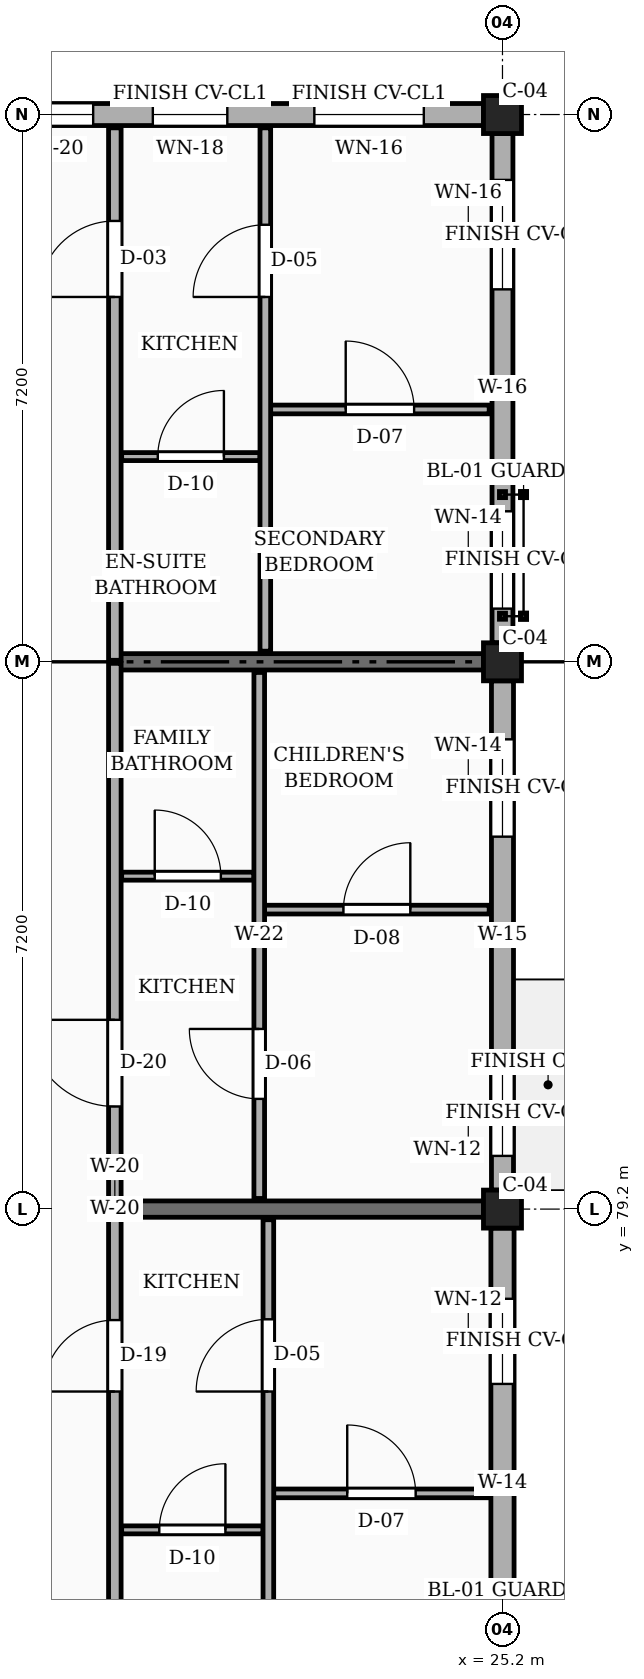
"""IFC4 building model, lengths in metres.
Left out: names, types, materials, properties, quantities, classifications, styles, units other than length and angle.
Written with IfcOpenShell. Run it as: python <this file> out.ifc"""

import sys

from ifc_helpers import new_model, si_unit, direction, frame, frame_2d, origin, origin_2d, place, context, subcontext, project, spatial, rectangle, extrude, element, fill, save


model = new_model("IFC4")
c1 = context("Model", 3, precision=1e-05, world=origin(), true_north=direction((0.0, 1.0)))
c2 = subcontext(c1, "Body", "Model", "MODEL_VIEW")
j1 = project(units=[si_unit("LENGTHUNIT", "METRE"), si_unit("PLANEANGLEUNIT", "RADIAN")], contexts=[c1])
p1 = place(None, origin())
s1 = spatial("IfcSite", under=j1, at=p1, CompositionType="ELEMENT")
p2 = place(p1, origin())
s2 = spatial("IfcBuilding", under=s1, at=p2, CompositionType="ELEMENT")
p3 = place(p2, frame((0.0, 0.0, 26.55)))
s3 = spatial("IfcBuildingStorey", under=s2, at=p3, CompositionType="ELEMENT", Elevation=26.55)
for number, where, z_axis, x_axis in (
    (1, (25.2, 79.2, 0.0), (0.0, 0.0, 1.0), (1.0, 0.0, 0.0)),
    (2, (25.2, 86.4, 0.0), (0.0, 0.0, 1.0), (1.0, 0.0, 0.0)),
    (3, (25.2, 93.6, 0.0), (0.0, 0.0, 1.0), (1.0, 0.0, 0.0)),
):
    element("IfcColumn", number, at=place(p3, frame(where, z_axis=z_axis, x_axis=x_axis)), inside=s3, PredefinedType="COLUMN", context=c2, shape_type="SweptSolid", body=[
        extrude(rectangle(XDim=0.5, YDim=0.5, at=origin_2d()), origin(), (0.0, 0.0, 1.0), 3.15),
    ])
for number, where, z_axis, x_axis in (
    (4, (20.1, 79.2, 0.0), (0.0, 0.0, 1.0), (1.0, 0.0, 0.0)),
    (5, (20.1, 86.4, 0.0), (0.0, 0.0, 1.0), (1.0, 0.0, 0.0)),
):
    element("IfcWall", number, at=place(p3, frame(where, z_axis=z_axis, x_axis=x_axis)), inside=s3, PredefinedType="SOLIDWALL", context=c2, shape_type="SweptSolid", body=[
        extrude(rectangle(XDim=4.85, YDim=0.215, at=frame_2d((2.425, 0.0))), origin(), (0.0, 0.0, 1.0), 2.22),
    ])
p4 = place(p3, frame((25.2, 72.25, 0.0), z_axis=(0.0, 0.0, 1.0), x_axis=(0.0, 1.0, 0.0)))
e6 = element("IfcWall", 6, at=p4, inside=s3, PredefinedType="SOLIDWALL", context=c2, shape_type="SweptSolid", body=[
    extrude(rectangle(XDim=6.7, YDim=0.305, at=frame_2d((3.35, 0.0))), origin(), (0.0, 0.0, 1.0), 2.46),
])
p5 = place(p4, frame((0.45, 0.0, 0.78)))
e7 = element("IfcOpeningElement", 7, at=p5, cuts=e6, PredefinedType="OPENING", context=c2, shape_type="SweptSolid", body=[
    extrude(rectangle(XDim=0.96, YDim=1.26, at=frame_2d((0.48, 0.63))), frame((0.0, 0.163, 0.0), z_axis=(0.0, -1.0, 0.0), x_axis=(1.0, 0.0, 0.0)), (0.0, 0.0, 1.0), 0.325),
])
p6 = place(p4, frame((4.65, 0.0, 0.78)))
e8 = element("IfcOpeningElement", 8, at=p6, cuts=e6, PredefinedType="OPENING", context=c2, shape_type="SweptSolid", body=[
    extrude(rectangle(XDim=1.12, YDim=1.26, at=frame_2d((0.56, 0.63))), frame((0.0, 0.163, 0.0), z_axis=(0.0, -1.0, 0.0), x_axis=(1.0, 0.0, 0.0)), (0.0, 0.0, 1.0), 0.325),
])
p7 = place(p3, frame((25.2, 79.45, 0.0), z_axis=(0.0, 0.0, 1.0), x_axis=(0.0, 1.0, 0.0)))
e9 = element("IfcWall", 9, at=p7, inside=s3, PredefinedType="SOLIDWALL", context=c2, shape_type="SweptSolid", body=[
    extrude(rectangle(XDim=6.7, YDim=0.29, at=frame_2d((3.35, 0.0))), origin(), (0.0, 0.0, 1.0), 2.46),
])
p8 = place(p7, frame((0.45, 0.0, 0.78)))
e10 = element("IfcOpeningElement", 10, at=p8, cuts=e9, PredefinedType="OPENING", context=c2, shape_type="SweptSolid", body=[
    extrude(rectangle(XDim=1.12, YDim=1.26, at=frame_2d((0.56, 0.63))), frame((0.0, 0.155, 0.0), z_axis=(0.0, -1.0, 0.0), x_axis=(1.0, 0.0, 0.0)), (0.0, 0.0, 1.0), 0.31),
])
p9 = place(p7, frame((4.65, 0.0, 0.78)))
e11 = element("IfcOpeningElement", 11, at=p9, cuts=e9, PredefinedType="OPENING", context=c2, shape_type="SweptSolid", body=[
    extrude(rectangle(XDim=1.28, YDim=1.26, at=frame_2d((0.64, 0.63))), frame((0.0, 0.155, 0.0), z_axis=(0.0, -1.0, 0.0), x_axis=(1.0, 0.0, 0.0)), (0.0, 0.0, 1.0), 0.31),
])
p10 = place(p3, frame((25.2, 86.65, 0.0), z_axis=(0.0, 0.0, 1.0), x_axis=(0.0, 1.0, 0.0)))
e12 = element("IfcWall", 12, at=p10, inside=s3, PredefinedType="SOLIDWALL", context=c2, shape_type="SweptSolid", body=[
    extrude(rectangle(XDim=6.7, YDim=0.275, at=frame_2d((3.35, 0.0))), origin(), (0.0, 0.0, 1.0), 2.46),
])
p11 = place(p10, frame((0.45, 0.0, 0.78)))
e13 = element("IfcOpeningElement", 13, at=p11, cuts=e12, PredefinedType="OPENING", context=c2, shape_type="SweptSolid", body=[
    extrude(rectangle(XDim=1.28, YDim=1.26, at=frame_2d((0.64, 0.63))), frame((0.0, 0.147, 0.0), z_axis=(0.0, -1.0, 0.0), x_axis=(1.0, 0.0, 0.0)), (0.0, 0.0, 1.0), 0.295),
])
p12 = place(p10, frame((4.65, 0.0, 0.78)))
e14 = element("IfcOpeningElement", 14, at=p12, cuts=e12, PredefinedType="OPENING", context=c2, shape_type="SweptSolid", body=[
    extrude(rectangle(XDim=1.44, YDim=1.26, at=frame_2d((0.72, 0.63))), frame((0.0, 0.147, 0.0), z_axis=(0.0, -1.0, 0.0), x_axis=(1.0, 0.0, 0.0)), (0.0, 0.0, 1.0), 0.295),
])
p13 = place(p3, frame((24.95, 93.6, 0.0), z_axis=(0.0, 0.0, 1.0), x_axis=(-1.0, 0.0, 0.0)))
e15 = element("IfcWall", 15, at=p13, inside=s3, PredefinedType="SOLIDWALL", context=c2, shape_type="SweptSolid", body=[
    extrude(rectangle(XDim=6.7, YDim=0.29, at=frame_2d((3.35, 0.0))), origin(), (0.0, 0.0, 1.0), 2.46),
])
p14 = place(p13, frame((0.785, 0.0, 0.78)))
e16 = element("IfcOpeningElement", 16, at=p14, cuts=e15, PredefinedType="OPENING", context=c2, shape_type="SweptSolid", body=[
    extrude(rectangle(XDim=1.44, YDim=1.26, at=frame_2d((0.72, 0.63))), frame((0.0, 0.155, 0.0), z_axis=(0.0, -1.0, 0.0), x_axis=(1.0, 0.0, 0.0)), (0.0, 0.0, 1.0), 0.31),
])
p15 = place(p13, frame((3.37, 0.0, 0.78)))
e17 = element("IfcOpeningElement", 17, at=p15, cuts=e15, PredefinedType="OPENING", context=c2, shape_type="SweptSolid", body=[
    extrude(rectangle(XDim=0.98, YDim=1.36, at=frame_2d((0.49, 0.68))), frame((0.0, 0.155, 0.0), z_axis=(0.0, -1.0, 0.0), x_axis=(1.0, 0.0, 0.0)), (0.0, 0.0, 1.0), 0.31),
])
p16 = place(p13, frame((5.135, 0.0, 0.78)))
e18 = element("IfcOpeningElement", 18, at=p16, cuts=e15, PredefinedType="OPENING", context=c2, shape_type="SweptSolid", body=[
    extrude(rectangle(XDim=1.14, YDim=1.36, at=frame_2d((0.57, 0.68))), frame((0.0, 0.155, 0.0), z_axis=(0.0, -1.0, 0.0), x_axis=(1.0, 0.0, 0.0)), (0.0, 0.0, 1.0), 0.31),
])
p17 = place(p3, frame((20.1, 72.02, 0.0), z_axis=(0.0, 0.0, 1.0), x_axis=(0.0, 1.0, 0.0)))
e19 = element("IfcWall", 19, at=p17, inside=s3, PredefinedType="PARTITIONING", context=c2, shape_type="SweptSolid", body=[
    extrude(rectangle(XDim=7.16, YDim=0.165, at=frame_2d((3.58, 0.0))), origin(), (0.0, 0.0, 1.0), 2.325),
])
p18 = place(p17, frame((4.78, 0.0, 0.0)))
e20 = element("IfcOpeningElement", 20, at=p18, cuts=e19, PredefinedType="OPENING", context=c2, shape_type="SweptSolid", body=[
    extrude(rectangle(XDim=0.94, YDim=2.12, at=frame_2d((0.47, 1.06))), frame((0.0, 0.093, 0.0), z_axis=(0.0, -1.0, 0.0), x_axis=(1.0, 0.0, 0.0)), (0.0, 0.0, 1.0), 0.185),
])
p19 = place(p3, frame((20.1, 79.22, 0.0), z_axis=(0.0, 0.0, 1.0), x_axis=(0.0, 1.0, 0.0)))
e21 = element("IfcWall", 21, at=p19, inside=s3, PredefinedType="PARTITIONING", context=c2, shape_type="SweptSolid", body=[
    extrude(rectangle(XDim=7.16, YDim=0.165, at=frame_2d((3.58, 0.0))), origin(), (0.0, 0.0, 1.0), 2.325),
])
p20 = place(p19, frame((1.33, 0.0, 0.0)))
e22 = element("IfcOpeningElement", 22, at=p20, cuts=e21, PredefinedType="OPENING", context=c2, shape_type="SweptSolid", body=[
    extrude(rectangle(XDim=1.14, YDim=2.18, at=frame_2d((0.57, 1.09))), frame((0.0, 0.093, 0.0), z_axis=(0.0, -1.0, 0.0), x_axis=(1.0, 0.0, 0.0)), (0.0, 0.0, 1.0), 0.185),
])
p21 = place(p3, frame((20.1, 86.42, 0.0), z_axis=(0.0, 0.0, 1.0), x_axis=(0.0, 1.0, 0.0)))
e23 = element("IfcWall", 23, at=p21, inside=s3, PredefinedType="PARTITIONING", context=c2, shape_type="SweptSolid", body=[
    extrude(rectangle(XDim=7.005, YDim=0.165, at=frame_2d((3.502, 0.0))), origin(), (0.0, 0.0, 1.0), 2.325),
])
p22 = place(p21, frame((4.78, 0.0, 0.0)))
e24 = element("IfcOpeningElement", 24, at=p22, cuts=e23, PredefinedType="OPENING", context=c2, shape_type="SweptSolid", body=[
    extrude(rectangle(XDim=1.0, YDim=2.15, at=frame_2d((0.5, 1.075))), frame((0.0, 0.093, 0.0), z_axis=(0.0, -1.0, 0.0), x_axis=(1.0, 0.0, 0.0)), (0.0, 0.0, 1.0), 0.185),
])
p23 = place(p3, frame((22.19, 75.46, 0.0), z_axis=(0.0, 0.0, 1.0), x_axis=(1.0, 0.0, 0.0)))
e25 = element("IfcWall", 25, at=p23, inside=s3, PredefinedType="PARTITIONING", context=c2, shape_type="SweptSolid", body=[
    extrude(rectangle(XDim=2.835, YDim=0.115, at=frame_2d((1.417, 0.0))), origin(), (0.0, 0.0, 1.0), 2.325),
])
p24 = place(p23, frame((0.968, 0.0, 0.0)))
e26 = element("IfcOpeningElement", 26, at=p24, cuts=e25, PredefinedType="OPENING", context=c2, shape_type="SweptSolid", body=[
    extrude(rectangle(XDim=0.9, YDim=2.1, at=frame_2d((0.45, 1.05))), frame((0.0, 0.067, 0.0), z_axis=(0.0, -1.0, 0.0), x_axis=(1.0, 0.0, 0.0)), (0.0, 0.0, 1.0), 0.135),
])
p25 = place(p3, frame((20.19, 74.98, 0.0), z_axis=(0.0, 0.0, 1.0), x_axis=(1.0, 0.0, 0.0)))
e27 = element("IfcWall", 27, at=p25, inside=s3, PredefinedType="PARTITIONING", context=c2, shape_type="SweptSolid", body=[
    extrude(rectangle(XDim=1.86, YDim=0.105, at=frame_2d((0.93, 0.0))), origin(), (0.0, 0.0, 1.0), 2.325),
])
p26 = place(p25, frame((0.495, 0.0, 0.0)))
e28 = element("IfcOpeningElement", 28, at=p26, cuts=e27, PredefinedType="OPENING", context=c2, shape_type="SweptSolid", body=[
    extrude(rectangle(XDim=0.87, YDim=2.05, at=frame_2d((0.435, 1.025))), frame((0.0, 0.062, 0.0), z_axis=(0.0, -1.0, 0.0), x_axis=(1.0, 0.0, 0.0)), (0.0, 0.0, 1.0), 0.125),
])
p27 = place(p3, frame((22.12, 72.14, 0.0), z_axis=(0.0, 0.0, 1.0), x_axis=(0.0, 1.0, 0.0)))
e29 = element("IfcWall", 29, at=p27, inside=s3, PredefinedType="PARTITIONING", context=c2, shape_type="SweptSolid", body=[
    extrude(rectangle(XDim=6.92, YDim=0.14, at=frame_2d((3.46, 0.0))), origin(), (0.0, 0.0, 1.0), 2.325),
])
p28 = place(p27, frame((4.66, 0.0, 0.0)))
e30 = element("IfcOpeningElement", 30, at=p28, cuts=e29, PredefinedType="OPENING", context=c2, shape_type="SweptSolid", body=[
    extrude(rectangle(XDim=0.95, YDim=2.1, at=frame_2d((0.475, 1.05))), frame((0.0, 0.08, 0.0), z_axis=(0.0, -1.0, 0.0), x_axis=(1.0, 0.0, 0.0)), (0.0, 0.0, 1.0), 0.16),
])
p29 = place(p3, frame((22.07, 83.14, 0.0), z_axis=(0.0, 0.0, 1.0), x_axis=(1.0, 0.0, 0.0)))
e31 = element("IfcWall", 31, at=p29, inside=s3, PredefinedType="PARTITIONING", context=c2, shape_type="SweptSolid", body=[
    extrude(rectangle(XDim=2.955, YDim=0.115, at=frame_2d((1.478, 0.0))), origin(), (0.0, 0.0, 1.0), 2.325),
])
p30 = place(p29, frame((1.038, 0.0, 0.0)))
e32 = element("IfcOpeningElement", 32, at=p30, cuts=e31, PredefinedType="OPENING", context=c2, shape_type="SweptSolid", body=[
    extrude(rectangle(XDim=0.88, YDim=2.08, at=frame_2d((0.44, 1.04))), frame((0.0, 0.067, 0.0), z_axis=(0.0, -1.0, 0.0), x_axis=(1.0, 0.0, 0.0)), (0.0, 0.0, 1.0), 0.135),
])
p31 = place(p3, frame((20.19, 83.58, 0.0), z_axis=(0.0, 0.0, 1.0), x_axis=(1.0, 0.0, 0.0)))
e33 = element("IfcWall", 33, at=p31, inside=s3, PredefinedType="PARTITIONING", context=c2, shape_type="SweptSolid", body=[
    extrude(rectangle(XDim=1.74, YDim=0.105, at=frame_2d((0.87, 0.0))), origin(), (0.0, 0.0, 1.0), 2.325),
])
p32 = place(p31, frame((0.435, 0.0, 0.0)))
e34 = element("IfcOpeningElement", 34, at=p32, cuts=e33, PredefinedType="OPENING", context=c2, shape_type="SweptSolid", body=[
    extrude(rectangle(XDim=0.87, YDim=2.05, at=frame_2d((0.435, 1.025))), frame((0.0, 0.062, 0.0), z_axis=(0.0, -1.0, 0.0), x_axis=(1.0, 0.0, 0.0)), (0.0, 0.0, 1.0), 0.125),
])
p33 = place(p3, frame((22.0, 79.34, 0.0), z_axis=(0.0, 0.0, 1.0), x_axis=(0.0, 1.0, 0.0)))
e35 = element("IfcWall", 35, at=p33, inside=s3, PredefinedType="PARTITIONING", context=c2, shape_type="SweptSolid", body=[
    extrude(rectangle(XDim=6.92, YDim=0.14, at=frame_2d((3.46, 0.0))), origin(), (0.0, 0.0, 1.0), 2.325),
])
p34 = place(p33, frame((1.31, 0.0, 0.0)))
e36 = element("IfcOpeningElement", 36, at=p34, cuts=e35, PredefinedType="OPENING", context=c2, shape_type="SweptSolid", body=[
    extrude(rectangle(XDim=0.92, YDim=2.1, at=frame_2d((0.46, 1.05))), frame((0.0, 0.08, 0.0), z_axis=(0.0, -1.0, 0.0), x_axis=(1.0, 0.0, 0.0)), (0.0, 0.0, 1.0), 0.16),
])
p35 = place(p3, frame((22.15, 89.72, 0.0), z_axis=(0.0, 0.0, 1.0), x_axis=(1.0, 0.0, 0.0)))
e37 = element("IfcWall", 37, at=p35, inside=s3, PredefinedType="PARTITIONING", context=c2, shape_type="SweptSolid", body=[
    extrude(rectangle(XDim=2.875, YDim=0.115, at=frame_2d((1.438, 0.0))), origin(), (0.0, 0.0, 1.0), 2.325),
])
p36 = place(p35, frame((0.988, 0.0, 0.0)))
e38 = element("IfcOpeningElement", 38, at=p36, cuts=e37, PredefinedType="OPENING", context=c2, shape_type="SweptSolid", body=[
    extrude(rectangle(XDim=0.9, YDim=2.1, at=frame_2d((0.45, 1.05))), frame((0.0, 0.067, 0.0), z_axis=(0.0, -1.0, 0.0), x_axis=(1.0, 0.0, 0.0)), (0.0, 0.0, 1.0), 0.135),
])
p37 = place(p3, frame((20.19, 89.1, 0.0), z_axis=(0.0, 0.0, 1.0), x_axis=(1.0, 0.0, 0.0)))
e39 = element("IfcWall", 39, at=p37, inside=s3, PredefinedType="PARTITIONING", context=c2, shape_type="SweptSolid", body=[
    extrude(rectangle(XDim=1.82, YDim=0.105, at=frame_2d((0.91, 0.0))), origin(), (0.0, 0.0, 1.0), 2.325),
])
p38 = place(p37, frame((0.475, 0.0, 0.0)))
e40 = element("IfcOpeningElement", 40, at=p38, cuts=e39, PredefinedType="OPENING", context=c2, shape_type="SweptSolid", body=[
    extrude(rectangle(XDim=0.87, YDim=2.05, at=frame_2d((0.435, 1.025))), frame((0.0, 0.062, 0.0), z_axis=(0.0, -1.0, 0.0), x_axis=(1.0, 0.0, 0.0)), (0.0, 0.0, 1.0), 0.125),
])
p39 = place(p3, frame((22.08, 86.54, 0.0), z_axis=(0.0, 0.0, 1.0), x_axis=(0.0, 1.0, 0.0)))
e41 = element("IfcWall", 41, at=p39, inside=s3, PredefinedType="PARTITIONING", context=c2, shape_type="SweptSolid", body=[
    extrude(rectangle(XDim=6.885, YDim=0.14, at=frame_2d((3.442, 0.0))), origin(), (0.0, 0.0, 1.0), 2.325),
])
p40 = place(p39, frame((4.66, 0.0, 0.0)))
e42 = element("IfcOpeningElement", 42, at=p40, cuts=e41, PredefinedType="OPENING", context=c2, shape_type="SweptSolid", body=[
    extrude(rectangle(XDim=0.95, YDim=2.1, at=frame_2d((0.475, 1.05))), frame((0.0, 0.08, 0.0), z_axis=(0.0, -1.0, 0.0), x_axis=(1.0, 0.0, 0.0)), (0.0, 0.0, 1.0), 0.16),
])
p41 = place(p6, origin())
e43 = element("IfcWindow", 43, at=p41, inside=s3, PartitioningType="SINGLE_PANEL", PredefinedType="WINDOW", context=c2, shape_type="SweptSolid", body=[
    extrude(rectangle(XDim=1.12, YDim=1.26, at=frame_2d((0.56, 0.63))), frame((0.0, 0.03, 0.0), z_axis=(0.0, -1.0, 0.0), x_axis=(1.0, 0.0, 0.0)), (0.0, 0.0, 1.0), 0.06),
])
fill(e8, e43)
p42 = place(p8, origin())
e44 = element("IfcWindow", 44, at=p42, inside=s3, PartitioningType="SINGLE_PANEL", PredefinedType="WINDOW", context=c2, shape_type="SweptSolid", body=[
    extrude(rectangle(XDim=1.12, YDim=1.26, at=frame_2d((0.56, 0.63))), frame((0.0, 0.03, 0.0), z_axis=(0.0, -1.0, 0.0), x_axis=(1.0, 0.0, 0.0)), (0.0, 0.0, 1.0), 0.06),
])
fill(e10, e44)
p43 = place(p9, origin())
e45 = element("IfcWindow", 45, at=p43, inside=s3, PartitioningType="SINGLE_PANEL", PredefinedType="WINDOW", context=c2, shape_type="SweptSolid", body=[
    extrude(rectangle(XDim=1.28, YDim=1.26, at=frame_2d((0.64, 0.63))), frame((0.0, 0.03, 0.0), z_axis=(0.0, -1.0, 0.0), x_axis=(1.0, 0.0, 0.0)), (0.0, 0.0, 1.0), 0.06),
])
fill(e11, e45)
p44 = place(p11, origin())
e46 = element("IfcWindow", 46, at=p44, inside=s3, PartitioningType="SINGLE_PANEL", PredefinedType="WINDOW", context=c2, shape_type="SweptSolid", body=[
    extrude(rectangle(XDim=1.28, YDim=1.26, at=frame_2d((0.64, 0.63))), frame((0.0, 0.03, 0.0), z_axis=(0.0, -1.0, 0.0), x_axis=(1.0, 0.0, 0.0)), (0.0, 0.0, 1.0), 0.06),
])
fill(e13, e46)
p45 = place(p12, origin())
e47 = element("IfcWindow", 47, at=p45, inside=s3, PartitioningType="SINGLE_PANEL", PredefinedType="WINDOW", context=c2, shape_type="SweptSolid", body=[
    extrude(rectangle(XDim=1.44, YDim=1.26, at=frame_2d((0.72, 0.63))), frame((0.0, 0.03, 0.0), z_axis=(0.0, -1.0, 0.0), x_axis=(1.0, 0.0, 0.0)), (0.0, 0.0, 1.0), 0.06),
])
fill(e14, e47)
p46 = place(p14, origin())
e48 = element("IfcWindow", 48, at=p46, inside=s3, PartitioningType="SINGLE_PANEL", PredefinedType="WINDOW", context=c2, shape_type="SweptSolid", body=[
    extrude(rectangle(XDim=1.44, YDim=1.26, at=frame_2d((0.72, 0.63))), frame((0.0, 0.03, 0.0), z_axis=(0.0, -1.0, 0.0), x_axis=(1.0, 0.0, 0.0)), (0.0, 0.0, 1.0), 0.06),
])
fill(e16, e48)
p47 = place(p15, origin())
e49 = element("IfcWindow", 49, at=p47, inside=s3, PartitioningType="SINGLE_PANEL", PredefinedType="WINDOW", context=c2, shape_type="SweptSolid", body=[
    extrude(rectangle(XDim=0.98, YDim=1.36, at=frame_2d((0.49, 0.68))), frame((0.0, 0.03, 0.0), z_axis=(0.0, -1.0, 0.0), x_axis=(1.0, 0.0, 0.0)), (0.0, 0.0, 1.0), 0.06),
])
fill(e17, e49)
p48 = place(p16, origin())
e50 = element("IfcWindow", 50, at=p48, inside=s3, PartitioningType="SINGLE_PANEL", PredefinedType="WINDOW", context=c2, shape_type="SweptSolid", body=[
    extrude(rectangle(XDim=1.14, YDim=1.36, at=frame_2d((0.57, 0.68))), frame((0.0, 0.03, 0.0), z_axis=(0.0, -1.0, 0.0), x_axis=(1.0, 0.0, 0.0)), (0.0, 0.0, 1.0), 0.06),
])
fill(e18, e50)
p49 = place(p18, origin())
e51 = element("IfcDoor", 51, at=p49, inside=s3, OperationType="SINGLE_SWING_LEFT", PredefinedType="DOOR", context=c2, shape_type="SweptSolid", body=[
    extrude(rectangle(XDim=0.94, YDim=2.12, at=frame_2d((0.47, 1.06))), frame((0.0, 0.025, 0.0), z_axis=(0.0, -1.0, 0.0), x_axis=(1.0, 0.0, 0.0)), (0.0, 0.0, 1.0), 0.05),
])
fill(e20, e51)
p50 = place(p20, origin())
e52 = element("IfcDoor", 52, at=p50, inside=s3, OperationType="SINGLE_SWING_RIGHT", PredefinedType="DOOR", context=c2, shape_type="SweptSolid", body=[
    extrude(rectangle(XDim=1.14, YDim=2.18, at=frame_2d((0.57, 1.09))), frame((0.0, 0.025, 0.0), z_axis=(0.0, -1.0, 0.0), x_axis=(1.0, 0.0, 0.0)), (0.0, 0.0, 1.0), 0.05),
])
fill(e22, e52)
p51 = place(p22, origin())
e53 = element("IfcDoor", 53, at=p51, inside=s3, OperationType="SINGLE_SWING_LEFT", PredefinedType="DOOR", context=c2, shape_type="SweptSolid", body=[
    extrude(rectangle(XDim=1.0, YDim=2.15, at=frame_2d((0.5, 1.075))), frame((0.0, 0.025, 0.0), z_axis=(0.0, -1.0, 0.0), x_axis=(1.0, 0.0, 0.0)), (0.0, 0.0, 1.0), 0.05),
])
fill(e24, e53)
p52 = place(p24, origin())
e54 = element("IfcDoor", 54, at=p52, inside=s3, OperationType="SINGLE_SWING_LEFT", PredefinedType="DOOR", context=c2, shape_type="SweptSolid", body=[
    extrude(rectangle(XDim=0.9, YDim=2.1, at=frame_2d((0.45, 1.05))), frame((0.0, 0.025, 0.0), z_axis=(0.0, -1.0, 0.0), x_axis=(1.0, 0.0, 0.0)), (0.0, 0.0, 1.0), 0.05),
])
fill(e26, e54)
p53 = place(p26, origin())
e55 = element("IfcDoor", 55, at=p53, inside=s3, OperationType="SINGLE_SWING_RIGHT", PredefinedType="DOOR", context=c2, shape_type="SweptSolid", body=[
    extrude(rectangle(XDim=0.87, YDim=2.05, at=frame_2d((0.435, 1.025))), frame((0.0, 0.025, 0.0), z_axis=(0.0, -1.0, 0.0), x_axis=(1.0, 0.0, 0.0)), (0.0, 0.0, 1.0), 0.05),
])
fill(e28, e55)
p54 = place(p28, origin())
e56 = element("IfcDoor", 56, at=p54, inside=s3, OperationType="SINGLE_SWING_LEFT", PredefinedType="DOOR", context=c2, shape_type="SweptSolid", body=[
    extrude(rectangle(XDim=0.95, YDim=2.1, at=frame_2d((0.475, 1.05))), frame((0.0, 0.025, 0.0), z_axis=(0.0, -1.0, 0.0), x_axis=(1.0, 0.0, 0.0)), (0.0, 0.0, 1.0), 0.05),
])
fill(e30, e56)
p55 = place(p30, origin())
e57 = element("IfcDoor", 57, at=p55, inside=s3, OperationType="SINGLE_SWING_RIGHT", PredefinedType="DOOR", context=c2, shape_type="SweptSolid", body=[
    extrude(rectangle(XDim=0.88, YDim=2.08, at=frame_2d((0.44, 1.04))), frame((0.0, 0.025, 0.0), z_axis=(0.0, -1.0, 0.0), x_axis=(1.0, 0.0, 0.0)), (0.0, 0.0, 1.0), 0.05),
])
fill(e32, e57)
p56 = place(p32, origin())
e58 = element("IfcDoor", 58, at=p56, inside=s3, OperationType="SINGLE_SWING_LEFT", PredefinedType="DOOR", context=c2, shape_type="SweptSolid", body=[
    extrude(rectangle(XDim=0.87, YDim=2.05, at=frame_2d((0.435, 1.025))), frame((0.0, 0.025, 0.0), z_axis=(0.0, -1.0, 0.0), x_axis=(1.0, 0.0, 0.0)), (0.0, 0.0, 1.0), 0.05),
])
fill(e34, e58)
p57 = place(p34, origin())
e59 = element("IfcDoor", 59, at=p57, inside=s3, OperationType="SINGLE_SWING_RIGHT", PredefinedType="DOOR", context=c2, shape_type="SweptSolid", body=[
    extrude(rectangle(XDim=0.92, YDim=2.1, at=frame_2d((0.46, 1.05))), frame((0.0, 0.025, 0.0), z_axis=(0.0, -1.0, 0.0), x_axis=(1.0, 0.0, 0.0)), (0.0, 0.0, 1.0), 0.05),
])
fill(e36, e59)
p58 = place(p36, origin())
e60 = element("IfcDoor", 60, at=p58, inside=s3, OperationType="SINGLE_SWING_LEFT", PredefinedType="DOOR", context=c2, shape_type="SweptSolid", body=[
    extrude(rectangle(XDim=0.9, YDim=2.1, at=frame_2d((0.45, 1.05))), frame((0.0, 0.025, 0.0), z_axis=(0.0, -1.0, 0.0), x_axis=(1.0, 0.0, 0.0)), (0.0, 0.0, 1.0), 0.05),
])
fill(e38, e60)
p59 = place(p38, origin())
e61 = element("IfcDoor", 61, at=p59, inside=s3, OperationType="SINGLE_SWING_RIGHT", PredefinedType="DOOR", context=c2, shape_type="SweptSolid", body=[
    extrude(rectangle(XDim=0.87, YDim=2.05, at=frame_2d((0.435, 1.025))), frame((0.0, 0.025, 0.0), z_axis=(0.0, -1.0, 0.0), x_axis=(1.0, 0.0, 0.0)), (0.0, 0.0, 1.0), 0.05),
])
fill(e40, e61)
p60 = place(p40, origin())
e62 = element("IfcDoor", 62, at=p60, inside=s3, OperationType="SINGLE_SWING_LEFT", PredefinedType="DOOR", context=c2, shape_type="SweptSolid", body=[
    extrude(rectangle(XDim=0.95, YDim=2.1, at=frame_2d((0.475, 1.05))), frame((0.0, 0.025, 0.0), z_axis=(0.0, -1.0, 0.0), x_axis=(1.0, 0.0, 0.0)), (0.0, 0.0, 1.0), 0.05),
])
fill(e42, e62)
save(model, sys.argv[1])
